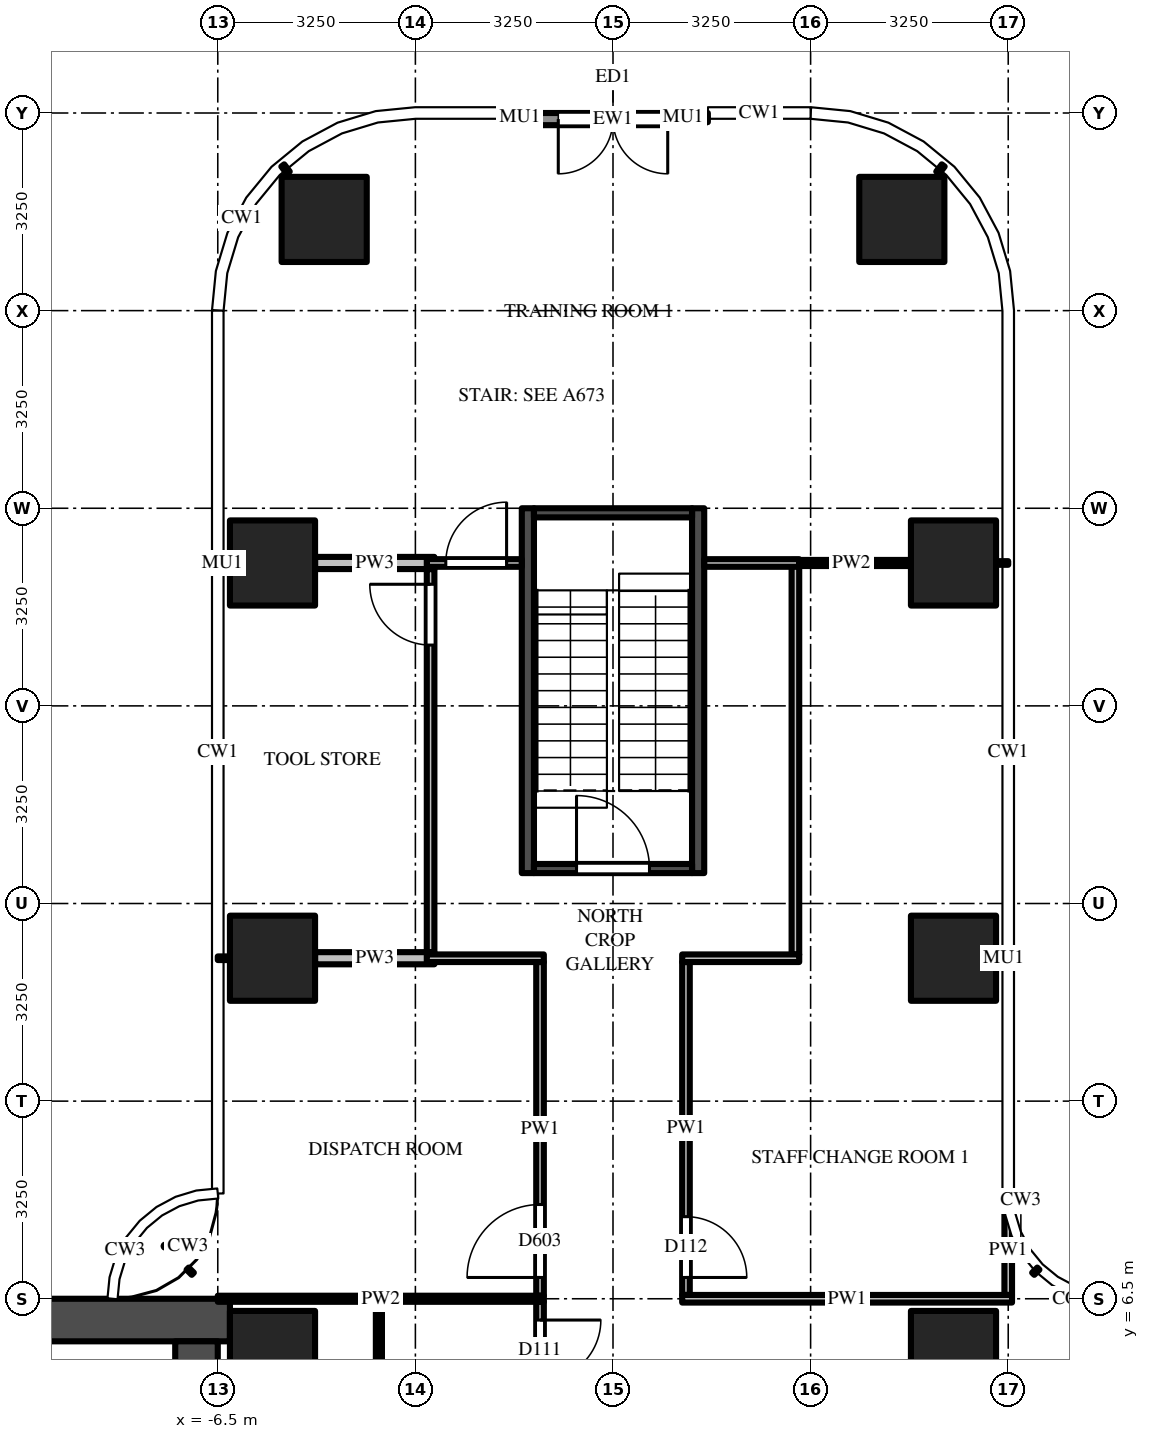
"""IFC4 building model, lengths in metres.
Left out: names, types, materials, properties, quantities, classifications, styles, units other than length and angle.
Written with IfcOpenShell. Run it as: python <this file> out.ifc"""

import sys

from ifc_helpers import new_model, si_unit, direction, frame, frame_2d, origin, origin_2d, place, context, subcontext, project, spatial, rectangle, extrude, source, transform, mapped, element, fill, save


model = new_model("IFC4")
c1 = context("Model", 3, precision=1e-05, world=origin(), true_north=direction((0.0, 1.0)))
c2 = subcontext(c1, "Body", "Model", "MODEL_VIEW")
j1 = project(units=[si_unit("LENGTHUNIT", "METRE"), si_unit("PLANEANGLEUNIT", "RADIAN")], contexts=[c1])
p1 = place(None, origin())
s1 = spatial("IfcSite", under=j1, at=p1, CompositionType="ELEMENT")
p2 = place(p1, origin())
s2 = spatial("IfcBuilding", under=s1, at=p2, CompositionType="ELEMENT")
p3 = place(p2, frame((0.0, 0.0, 70.0)))
s3 = spatial("IfcBuildingStorey", under=s2, at=p3, CompositionType="ELEMENT", Elevation=70.0)
m1 = source(origin(), c2, "Body", "SweptSolid", [
    extrude(rectangle(XDim=1.4, YDim=1.4, at=origin_2d()), origin(), (0.0, 0.0, 1.0), 4.5),
])
for number, where, z_axis, x_axis in (
    (1, (-5.6, 12.1, 0.0), (0.0, 0.0, 1.0), (1.0, 0.0, 0.0)),
    (2, (-5.6, 18.6, 0.0), (0.0, 0.0, 1.0), (1.0, 0.0, 0.0)),
    (3, (-4.75, 24.25, 0.0), (0.0, 0.0, 1.0), (1.0, 0.0, 0.0)),
    (4, (5.6, 12.1, 0.0), (0.0, 0.0, 1.0), (1.0, 0.0, 0.0)),
    (5, (5.6, 18.6, 0.0), (0.0, 0.0, 1.0), (1.0, 0.0, 0.0)),
    (6, (4.75, 24.25, 0.0), (0.0, 0.0, 1.0), (1.0, 0.0, 0.0)),
    (7, (5.6, 5.6, 0.0), (0.0, 0.0, 1.0), (1.0, 0.0, 0.0)),
    (8, (-5.6, 5.6, 0.0), (0.0, 0.0, 1.0), (1.0, 0.0, 0.0)),
):
    element("IfcColumn", number, at=place(p3, frame(where, z_axis=z_axis, x_axis=x_axis)), inside=s3, PredefinedType="COLUMN", context=c2, shape_type="MappedRepresentation", body=[
        mapped(m1, transform((0.0, 0.0, 0.0))),
    ])
m2 = source(origin(), c2, "Body", "SweptSolid", [
    extrude(rectangle(XDim=16.45, YDim=0.7, at=frame_2d((8.225, 0.0))), origin(), (0.0, 0.0, 1.0), 4.25),
])
p4 = place(p3, frame((-6.3, 6.15, 0.0), z_axis=(0.0, 0.0, 1.0), x_axis=(-1.0, 0.0, 0.0)))
e9 = element("IfcWall", 9, at=p4, inside=s3, PredefinedType="SHEAR", context=c2, shape_type="MappedRepresentation", body=[
    mapped(m2, transform((0.0, 0.0, 0.0))),
])
m3 = source(origin(), c2, "Body", "SweptSolid", [
    extrude(rectangle(XDim=9.05, YDim=0.7, at=frame_2d((4.525, 0.0))), origin(), (0.0, 0.0, 1.0), 4.25),
])
p5 = place(p3, frame((-6.85, 5.8, 0.0), z_axis=(0.0, 0.0, 1.0), x_axis=(0.0, -1.0, 0.0)))
e10 = element("IfcWall", 10, at=p5, inside=s3, PredefinedType="SHEAR", context=c2, shape_type="MappedRepresentation", body=[
    mapped(m3, transform((0.0, 0.0, 0.0))),
])
m4 = source(origin(), c2, "Body", "SweptSolid", [
    extrude(rectangle(XDim=1.8, YDim=2.1, at=frame_2d((0.9, 1.05))), frame((0.0, 0.36, 0.0), z_axis=(0.0, -1.0, 0.0), x_axis=(1.0, 0.0, 0.0)), (0.0, 0.0, 1.0), 0.72),
])
p6 = place(p5, frame((3.15, 0.0, 0.0)))
e11 = element("IfcOpeningElement", 11, at=p6, cuts=e10, PredefinedType="OPENING", context=c2, shape_type="MappedRepresentation", body=[
    mapped(m4, transform((0.0, 0.0, 0.0))),
])
m5 = source(origin(), c2, "Body", "SweptSolid", [
    extrude(rectangle(XDim=6.0, YDim=0.2, at=frame_2d((3.0, 0.0))), origin(), (0.0, 0.0, 1.0), 4.25),
])
for number, where, z_axis, x_axis in (
    (12, (-1.4, 13.5, 0.0), (0.0, 0.0, 1.0), (0.0, 1.0, 0.0)),
    (13, (1.4, 13.5, 0.0), (0.0, 0.0, 1.0), (0.0, 1.0, 0.0)),
):
    element("IfcWall", number, at=place(p3, frame(where, z_axis=z_axis, x_axis=x_axis)), inside=s3, PredefinedType="SHEAR", context=c2, shape_type="MappedRepresentation", body=[
        mapped(m5, transform((0.0, 0.0, 0.0))),
    ])
m6 = source(origin(), c2, "Body", "SweptSolid", [
    extrude(rectangle(XDim=2.6, YDim=0.15, at=frame_2d((1.3, 0.0))), origin(), (0.0, 0.0, 1.0), 4.25),
])
p7 = place(p3, frame((-1.3, 13.575, 0.0), z_axis=(0.0, 0.0, 1.0), x_axis=(1.0, 0.0, 0.0)))
e14 = element("IfcWall", 14, at=p7, inside=s3, PredefinedType="SHEAR", context=c2, shape_type="MappedRepresentation", body=[
    mapped(m6, transform((0.0, 0.0, 0.0))),
])
m7 = source(origin(), c2, "Body", "SweptSolid", [
    extrude(rectangle(XDim=1.2, YDim=2.1, at=frame_2d((0.6, 1.05))), frame((0.0, 0.085, 0.0), z_axis=(0.0, -1.0, 0.0), x_axis=(1.0, 0.0, 0.0)), (0.0, 0.0, 1.0), 0.17),
])
p8 = place(p7, frame((0.7, 0.0, 0.0)))
e15 = element("IfcOpeningElement", 15, at=p8, cuts=e14, PredefinedType="OPENING", context=c2, shape_type="MappedRepresentation", body=[
    mapped(m7, transform((0.0, 0.0, 0.0))),
])
p9 = place(p3, frame((-1.3, 19.425, 0.0), z_axis=(0.0, 0.0, 1.0), x_axis=(1.0, 0.0, 0.0)))
e16 = element("IfcWall", 16, at=p9, inside=s3, PredefinedType="SHEAR", context=c2, shape_type="MappedRepresentation", body=[
    mapped(m6, transform((0.0, 0.0, 0.0))),
])
m8 = source(origin(), c2, "Body", "SweptSolid", [
    extrude(rectangle(XDim=3.0, YDim=0.2, at=frame_2d((1.5, 0.0))), origin(), (0.0, 0.0, 1.0), 4.25),
])
p10 = place(p3, frame((1.5, 25.9, 0.0), z_axis=(0.0, 0.0, 1.0), x_axis=(-1.0, 0.0, 0.0)))
e17 = element("IfcWall", 17, at=p10, inside=s3, PredefinedType="SOLIDWALL", context=c2, shape_type="MappedRepresentation", body=[
    mapped(m8, transform((0.0, 0.0, 0.0))),
])
m9 = source(origin(), c2, "Body", "SweptSolid", [
    extrude(rectangle(XDim=1.8, YDim=2.4, at=frame_2d((0.9, 1.2))), frame((0.0, 0.11, 0.0), z_axis=(0.0, -1.0, 0.0), x_axis=(1.0, 0.0, 0.0)), (0.0, 0.0, 1.0), 0.22),
])
p11 = place(p10, frame((0.6, 0.0, 0.0)))
e18 = element("IfcOpeningElement", 18, at=p11, cuts=e17, PredefinedType="OPENING", context=c2, shape_type="MappedRepresentation", body=[
    mapped(m9, transform((0.0, 0.0, 0.0))),
])
m10 = source(origin(), c2, "Body", "SweptSolid", [
    extrude(rectangle(XDim=3.137, YDim=0.1, at=frame_2d((1.569, 0.0))), origin(), (0.0, 0.0, 1.0), 3.468),
])
p12 = place(p3, frame((-3.85, 3.312, 0.0), z_axis=(0.0, 0.0, 1.0), x_axis=(0.0, 1.0, 0.0)))
e19 = element("IfcWall", 19, at=p12, inside=s3, PredefinedType="PARTITIONING", context=c2, shape_type="MappedRepresentation", body=[
    mapped(m10, transform((0.0, 0.0, 0.0))),
])
m11 = source(origin(), c2, "Body", "SweptSolid", [
    extrude(rectangle(XDim=6.3, YDim=0.125, at=frame_2d((3.15, 0.0))), origin(), (0.0, 0.0, 1.0), 3.468),
])
p13 = place(p3, frame((-3.0, 12.2, 0.0), z_axis=(0.0, 0.0, 1.0), x_axis=(0.0, 1.0, 0.0)))
e20 = element("IfcWall", 20, at=p13, inside=s3, PredefinedType="PARTITIONING", context=c2, shape_type="MappedRepresentation", body=[
    mapped(m11, transform((0.0, 0.0, 0.0))),
])
m12 = source(origin(), c2, "Body", "SweptSolid", [
    extrude(rectangle(XDim=1.0, YDim=2.1, at=frame_2d((0.5, 1.05))), frame((0.0, 0.073, 0.0), z_axis=(0.0, -1.0, 0.0), x_axis=(1.0, 0.0, 0.0)), (0.0, 0.0, 1.0), 0.145),
])
p14 = place(p13, frame((5.05, 0.0, 0.0)))
e21 = element("IfcOpeningElement", 21, at=p14, cuts=e20, PredefinedType="OPENING", context=c2, shape_type="MappedRepresentation", body=[
    mapped(m12, transform((0.0, 0.0, 0.0))),
])
m13 = source(origin(), c2, "Body", "SweptSolid", [
    extrude(rectangle(XDim=3.137, YDim=0.125, at=frame_2d((1.569, 0.0))), origin(), (0.0, 0.0, 1.0), 3.468),
])
p15 = place(p3, frame((-1.2, 6.45, 0.0), z_axis=(0.0, 0.0, 1.0), x_axis=(0.0, -1.0, 0.0)))
e22 = element("IfcWall", 22, at=p15, inside=s3, PredefinedType="PARTITIONING", context=c2, shape_type="MappedRepresentation", body=[
    mapped(m13, transform((0.0, 0.0, 0.0))),
])
p16 = place(p15, frame((0.3, 0.0, 0.0)))
e23 = element("IfcOpeningElement", 23, at=p16, cuts=e22, PredefinedType="OPENING", context=c2, shape_type="MappedRepresentation", body=[
    mapped(m12, transform((0.0, 0.0, 0.0))),
])
m14 = source(origin(), c2, "Body", "SweptSolid", [
    extrude(rectangle(XDim=5.488, YDim=0.125, at=frame_2d((2.744, 0.0))), origin(), (0.0, 0.0, 1.0), 3.468),
])
p17 = place(p3, frame((-1.2, 6.55, 0.0), z_axis=(0.0, 0.0, 1.0), x_axis=(0.0, 1.0, 0.0)))
e24 = element("IfcWall", 24, at=p17, inside=s3, PredefinedType="PARTITIONING", context=c2, shape_type="MappedRepresentation", body=[
    mapped(m14, transform((0.0, 0.0, 0.0))),
])
m15 = source(origin(), c2, "Body", "SweptSolid", [
    extrude(rectangle(XDim=1.2, YDim=2.1, at=frame_2d((0.6, 1.05))), frame((0.0, 0.073, 0.0), z_axis=(0.0, -1.0, 0.0), x_axis=(1.0, 0.0, 0.0)), (0.0, 0.0, 1.0), 0.145),
])
p18 = place(p17, frame((0.3, 0.0, 0.0)))
e25 = element("IfcOpeningElement", 25, at=p18, cuts=e24, PredefinedType="OPENING", context=c2, shape_type="MappedRepresentation", body=[
    mapped(m15, transform((0.0, 0.0, 0.0))),
])
m16 = source(origin(), c2, "Body", "SweptSolid", [
    extrude(rectangle(XDim=5.475, YDim=0.125, at=frame_2d((2.738, 0.0))), origin(), (0.0, 0.0, 1.0), 3.468),
])
p19 = place(p3, frame((1.2, 12.038, 0.0), z_axis=(0.0, 0.0, 1.0), x_axis=(0.0, -1.0, 0.0)))
e26 = element("IfcWall", 26, at=p19, inside=s3, PredefinedType="PARTITIONING", context=c2, shape_type="MappedRepresentation", body=[
    mapped(m16, transform((0.0, 0.0, 0.0))),
])
p20 = place(p19, frame((4.188, 0.0, 0.0)))
e27 = element("IfcOpeningElement", 27, at=p20, cuts=e26, PredefinedType="OPENING", context=c2, shape_type="MappedRepresentation", body=[
    mapped(m12, transform((0.0, 0.0, 0.0))),
])
m17 = source(origin(), c2, "Body", "SweptSolid", [
    extrude(rectangle(XDim=6.387, YDim=0.125, at=frame_2d((3.194, 0.0))), origin(), (0.0, 0.0, 1.0), 3.468),
])
p21 = place(p3, frame((3.0, 18.55, 0.0), z_axis=(0.0, 0.0, 1.0), x_axis=(0.0, -1.0, 0.0)))
e28 = element("IfcWall", 28, at=p21, inside=s3, PredefinedType="PARTITIONING", context=c2, shape_type="MappedRepresentation", body=[
    mapped(m17, transform((0.0, 0.0, 0.0))),
])
m18 = source(origin(), c2, "Body", "SweptSolid", [
    extrude(rectangle(XDim=1.469, YDim=0.125, at=frame_2d((0.734, 0.0))), origin(), (0.0, 0.0, 1.0), 4.25),
])
p22 = place(p3, frame((6.5, 6.562, 0.0), z_axis=(0.0, 0.0, 1.0), x_axis=(0.0, 1.0, 0.0)))
e29 = element("IfcWall", 29, at=p22, inside=s3, PredefinedType="PARTITIONING", context=c2, shape_type="MappedRepresentation", body=[
    mapped(m18, transform((0.0, 0.0, 0.0))),
])
m19 = source(origin(), c2, "Body", "SweptSolid", [
    extrude(rectangle(XDim=5.363, YDim=0.1, at=frame_2d((2.681, 0.0))), origin(), (0.0, 0.0, 1.0), 3.33),
])
p23 = place(p3, frame((-6.5, 6.5, 0.0), z_axis=(0.0, 0.0, 1.0), x_axis=(1.0, 0.0, 0.0)))
e30 = element("IfcWall", 30, at=p23, inside=s3, PredefinedType="PARTITIONING", context=c2, shape_type="MappedRepresentation", body=[
    mapped(m19, transform((0.0, 0.0, 0.0))),
])
m20 = source(origin(), c2, "Body", "SweptSolid", [
    extrude(rectangle(XDim=5.425, YDim=0.125, at=frame_2d((2.712, 0.0))), origin(), (0.0, 0.0, 1.0), 3.33),
])
p24 = place(p3, frame((1.137, 6.5, 0.0), z_axis=(0.0, 0.0, 1.0), x_axis=(1.0, 0.0, 0.0)))
e31 = element("IfcWall", 31, at=p24, inside=s3, PredefinedType="PARTITIONING", context=c2, shape_type="MappedRepresentation", body=[
    mapped(m20, transform((0.0, 0.0, 0.0))),
])
m21 = source(origin(), c2, "Body", "SweptSolid", [
    extrude(rectangle(XDim=1.962, YDim=0.2, at=frame_2d((0.981, 0.0))), origin(), (0.0, 0.0, 1.0), 3.468),
])
p25 = place(p3, frame((-4.9, 12.1, 0.0), z_axis=(0.0, 0.0, 1.0), x_axis=(1.0, 0.0, 0.0)))
e32 = element("IfcWall", 32, at=p25, inside=s3, PredefinedType="PARTITIONING", context=c2, shape_type="MappedRepresentation", body=[
    mapped(m21, transform((0.0, 0.0, 0.0))),
])
m22 = source(origin(), c2, "Body", "SweptSolid", [
    extrude(rectangle(XDim=1.925, YDim=0.125, at=frame_2d((0.962, 0.0))), origin(), (0.0, 0.0, 1.0), 3.468),
])
for number, where, z_axis, x_axis in (
    (33, (-1.137, 12.1, 0.0), (0.0, 0.0, 1.0), (-1.0, 0.0, 0.0)),
    (34, (3.062, 12.1, 0.0), (0.0, 0.0, 1.0), (-1.0, 0.0, 0.0)),
):
    element("IfcWall", number, at=place(p3, frame(where, z_axis=z_axis, x_axis=x_axis)), inside=s3, PredefinedType="PARTITIONING", context=c2, shape_type="MappedRepresentation", body=[
        mapped(m22, transform((0.0, 0.0, 0.0))),
    ])
m23 = source(origin(), c2, "Body", "SweptSolid", [
    extrude(rectangle(XDim=1.962, YDim=0.2, at=frame_2d((0.981, 0.0))), origin(), (0.0, 0.0, 1.0), 3.697),
])
p26 = place(p3, frame((-4.9, 18.6, 0.0), z_axis=(0.0, 0.0, 1.0), x_axis=(1.0, 0.0, 0.0)))
e35 = element("IfcWall", 35, at=p26, inside=s3, PredefinedType="PARTITIONING", context=c2, shape_type="MappedRepresentation", body=[
    mapped(m23, transform((0.0, 0.0, 0.0))),
])
m24 = source(origin(), c2, "Body", "SweptSolid", [
    extrude(rectangle(XDim=1.962, YDim=0.1, at=frame_2d((0.981, 0.0))), origin(), (0.0, 0.0, 1.0), 3.697),
])
p27 = place(p3, frame((2.938, 18.6, 0.0), z_axis=(0.0, 0.0, 1.0), x_axis=(1.0, 0.0, 0.0)))
e36 = element("IfcWall", 36, at=p27, inside=s3, PredefinedType="PARTITIONING", context=c2, shape_type="MappedRepresentation", body=[
    mapped(m24, transform((0.0, 0.0, 0.0))),
])
m25 = source(origin(), c2, "Body", "SweptSolid", [
    extrude(rectangle(XDim=1.562, YDim=0.125, at=frame_2d((0.781, 0.0))), origin(), (0.0, 0.0, 1.0), 3.697),
])
p28 = place(p3, frame((-3.062, 18.6, 0.0), z_axis=(0.0, 0.0, 1.0), x_axis=(1.0, 0.0, 0.0)))
e37 = element("IfcWall", 37, at=p28, inside=s3, PredefinedType="PARTITIONING", context=c2, shape_type="MappedRepresentation", body=[
    mapped(m25, transform((0.0, 0.0, 0.0))),
])
p29 = place(p28, frame((0.312, 0.0, 0.0)))
e38 = element("IfcOpeningElement", 38, at=p29, cuts=e37, PredefinedType="OPENING", context=c2, shape_type="MappedRepresentation", body=[
    mapped(m12, transform((0.0, 0.0, 0.0))),
])
p30 = place(p3, frame((1.5, 18.6, 0.0), z_axis=(0.0, 0.0, 1.0), x_axis=(1.0, 0.0, 0.0)))
e39 = element("IfcWall", 39, at=p30, inside=s3, PredefinedType="PARTITIONING", context=c2, shape_type="MappedRepresentation", body=[
    mapped(m25, transform((0.0, 0.0, 0.0))),
])
m26 = source(origin(), c2, "Body", "SweptSolid", [
    extrude(rectangle(XDim=1.2, YDim=2.1, at=frame_2d((0.6, 1.05))), frame((0.0, 0.025, 0.0), z_axis=(0.0, -1.0, 0.0), x_axis=(1.0, 0.0, 0.0)), (0.0, 0.0, 1.0), 0.05),
])
p31 = place(p8, origin())
e40 = element("IfcDoor", 40, at=p31, inside=s3, OperationType="SINGLE_SWING_LEFT", PredefinedType="DOOR", context=c2, shape_type="MappedRepresentation", body=[
    mapped(m26, transform((0.0, 0.0, 0.0))),
])
fill(e15, e40)
m27 = source(origin(), c2, "Body", "SweptSolid", [
    extrude(rectangle(XDim=1.8, YDim=2.4, at=frame_2d((0.9, 1.2))), frame((0.0, 0.025, 0.0), z_axis=(0.0, -1.0, 0.0), x_axis=(1.0, 0.0, 0.0)), (0.0, 0.0, 1.0), 0.05),
])
p32 = place(p11, origin())
e41 = element("IfcDoor", 41, at=p32, inside=s3, OperationType="DOUBLE_DOOR_SINGLE_SWING", PredefinedType="DOOR", context=c2, shape_type="MappedRepresentation", body=[
    mapped(m27, transform((0.0, 0.0, 0.0))),
])
fill(e18, e41)
m28 = source(origin(), c2, "Body", "SweptSolid", [
    extrude(rectangle(XDim=1.0, YDim=2.1, at=frame_2d((0.5, 1.05))), frame((0.0, 0.025, 0.0), z_axis=(0.0, -1.0, 0.0), x_axis=(1.0, 0.0, 0.0)), (0.0, 0.0, 1.0), 0.05),
])
p33 = place(p16, origin())
e42 = element("IfcDoor", 42, at=p33, inside=s3, OperationType="SINGLE_SWING_LEFT", PredefinedType="DOOR", context=c2, shape_type="MappedRepresentation", body=[
    mapped(m28, transform((0.0, 0.0, 0.0))),
])
fill(e23, e42)
p34 = place(p20, origin())
e43 = element("IfcDoor", 43, at=p34, inside=s3, OperationType="SINGLE_SWING_RIGHT", PredefinedType="DOOR", context=c2, shape_type="MappedRepresentation", body=[
    mapped(m28, transform((0.0, 0.0, 0.0))),
])
fill(e27, e43)
p35 = place(p18, origin())
e44 = element("IfcDoor", 44, at=p35, inside=s3, OperationType="SINGLE_SWING_LEFT", PredefinedType="DOOR", context=c2, shape_type="MappedRepresentation", body=[
    mapped(m26, transform((0.0, 0.0, 0.0))),
])
fill(e25, e44)
p36 = place(p14, origin())
e45 = element("IfcDoor", 45, at=p36, inside=s3, OperationType="SINGLE_SWING_RIGHT", PredefinedType="DOOR", context=c2, shape_type="MappedRepresentation", body=[
    mapped(m28, transform((0.0, 0.0, 0.0))),
])
fill(e21, e45)
p37 = place(p29, origin())
e46 = element("IfcDoor", 46, at=p37, inside=s3, OperationType="SINGLE_SWING_RIGHT", PredefinedType="DOOR", context=c2, shape_type="MappedRepresentation", body=[
    mapped(m28, transform((0.0, 0.0, 0.0))),
])
fill(e38, e46)
save(model, sys.argv[1])
